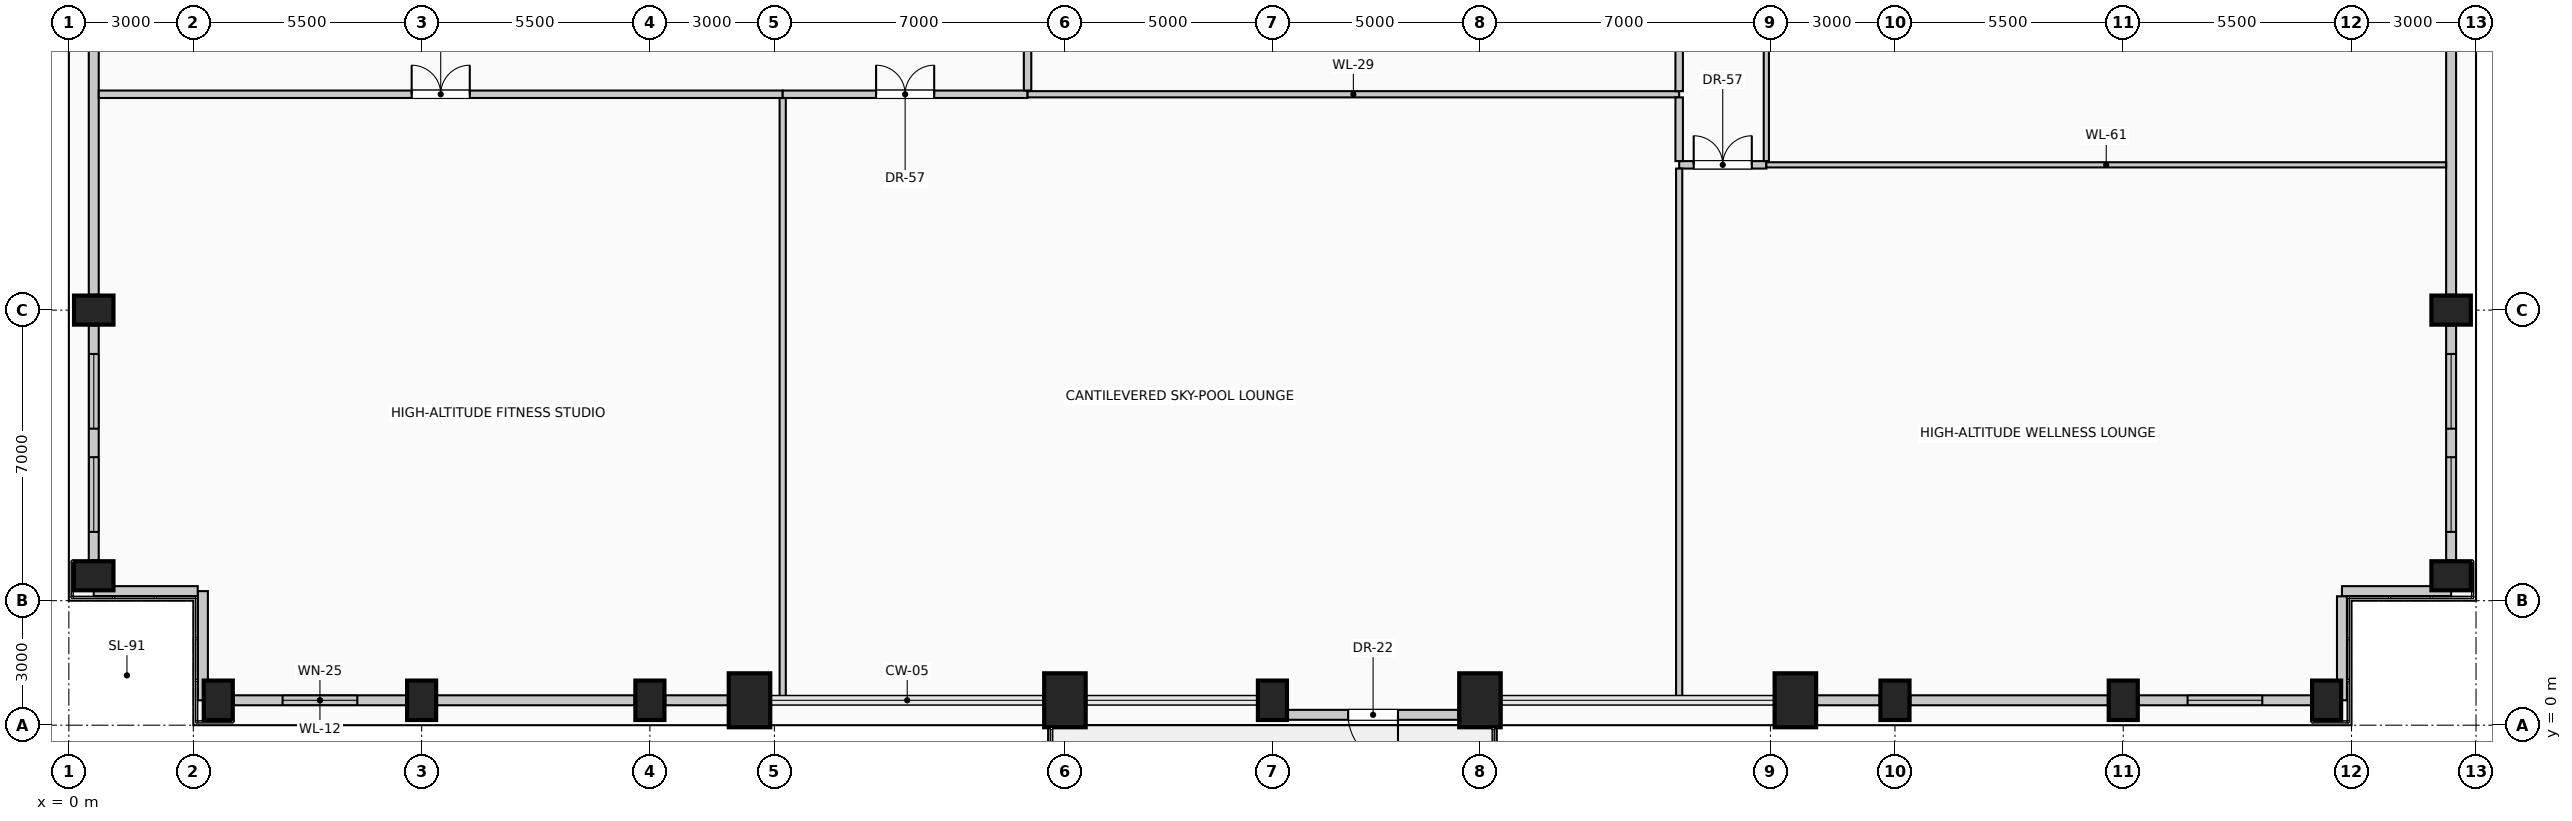
"""IFC4 building model, lengths in metres.
Left out: names, types, materials, properties, quantities, classifications, styles, units other than length and angle.
Written with IfcOpenShell. Run it as: python <this file> out.ifc"""

import sys

from ifc_helpers import new_model, si_unit, direction, frame, frame_2d, origin, origin_2d, place, context, subcontext, project, spatial, rectangle, extrude, element, fill, save


model = new_model("IFC4")
c1 = context("Model", 3, precision=1e-05, world=origin(), true_north=direction((0.0, 1.0)))
c2 = subcontext(c1, "Body", "Model", "MODEL_VIEW")
j1 = project(units=[si_unit("LENGTHUNIT", "METRE"), si_unit("PLANEANGLEUNIT", "RADIAN")], contexts=[c1])
p1 = place(None, origin())
s1 = spatial("IfcSite", under=j1, at=p1, CompositionType="ELEMENT")
p2 = place(p1, origin())
s2 = spatial("IfcBuilding", under=s1, at=p2, CompositionType="ELEMENT")
p3 = place(p2, frame((0.0, 0.0, 280.6)))
s3 = spatial("IfcBuildingStorey", under=s2, at=p3, CompositionType="ELEMENT", Elevation=280.6)
for number, where, z_axis, x_axis in (
    (1, (3.6, 0.6, 0.0), (0.0, 0.0, 1.0), (1.0, 0.0, 0.0)),
    (2, (8.5, 0.6, 0.0), (0.0, 0.0, 1.0), (1.0, 0.0, 0.0)),
    (3, (14.0, 0.6, 0.0), (0.0, 0.0, 1.0), (1.0, 0.0, 0.0)),
):
    element("IfcColumn", number, at=place(p3, frame(where, z_axis=z_axis, x_axis=x_axis)), inside=s3, PredefinedType="COLUMN", context=c2, shape_type="SweptSolid", body=[
        extrude(rectangle(XDim=0.7, YDim=0.95, at=origin_2d()), origin(), (0.0, 0.0, 1.0), 4.4),
    ])
for number, where, z_axis, x_axis in (
    (4, (16.4, 0.6, 0.0), (0.0, 0.0, 1.0), (1.0, 0.0, 0.0)),
    (5, (24.0, 0.6, 0.0), (0.0, 0.0, 1.0), (1.0, 0.0, 0.0)),
):
    element("IfcColumn", number, at=place(p3, frame(where, z_axis=z_axis, x_axis=x_axis)), inside=s3, PredefinedType="COLUMN", context=c2, shape_type="SweptSolid", body=[
        extrude(rectangle(XDim=1.0, YDim=1.3, at=origin_2d()), origin(), (0.0, 0.0, 1.0), 4.4),
    ])
p4 = place(p3, frame((29.0, 0.6, 0.0), z_axis=(0.0, 0.0, 1.0), x_axis=(1.0, 0.0, 0.0)))
e6 = element("IfcColumn", 6, at=p4, inside=s3, PredefinedType="COLUMN", context=c2, shape_type="SweptSolid", body=[
    extrude(rectangle(XDim=0.7, YDim=0.95, at=origin_2d()), origin(), (0.0, 0.0, 1.0), 4.4),
])
for number, where, z_axis, x_axis in (
    (7, (34.0, 0.6, 0.0), (0.0, 0.0, 1.0), (1.0, 0.0, 0.0)),
    (8, (41.6, 0.6, 0.0), (0.0, 0.0, 1.0), (1.0, 0.0, 0.0)),
):
    element("IfcColumn", number, at=place(p3, frame(where, z_axis=z_axis, x_axis=x_axis)), inside=s3, PredefinedType="COLUMN", context=c2, shape_type="SweptSolid", body=[
        extrude(rectangle(XDim=1.0, YDim=1.3, at=origin_2d()), origin(), (0.0, 0.0, 1.0), 4.4),
    ])
for number, where, z_axis, x_axis in (
    (9, (44.0, 0.6, 0.0), (0.0, 0.0, 1.0), (1.0, 0.0, 0.0)),
    (10, (49.5, 0.6, 0.0), (0.0, 0.0, 1.0), (1.0, 0.0, 0.0)),
    (11, (54.4, 0.6, 0.0), (0.0, 0.0, 1.0), (1.0, 0.0, 0.0)),
    (12, (0.6, 3.6, 0.0), (0.0, 0.0, 1.0), (0.0, 1.0, 0.0)),
    (13, (57.4, 3.6, 0.0), (0.0, 0.0, 1.0), (0.0, 1.0, 0.0)),
    (14, (0.6, 10.0, 0.0), (0.0, 0.0, 1.0), (0.0, 1.0, 0.0)),
    (15, (57.4, 10.0, 0.0), (0.0, 0.0, 1.0), (0.0, 1.0, 0.0)),
):
    element("IfcColumn", number, at=place(p3, frame(where, z_axis=z_axis, x_axis=x_axis)), inside=s3, PredefinedType="COLUMN", context=c2, shape_type="SweptSolid", body=[
        extrude(rectangle(XDim=0.7, YDim=0.95, at=origin_2d()), origin(), (0.0, 0.0, 1.0), 4.4),
    ])
p5 = place(p3, frame((8.13, 0.6, 0.0), z_axis=(0.0, 0.0, 1.0), x_axis=(-1.0, 0.0, 0.0)))
e16 = element("IfcWall", 16, at=p5, inside=s3, PredefinedType="SOLIDWALL", context=c2, shape_type="SweptSolid", body=[
    extrude(rectangle(XDim=4.16, YDim=0.24, at=frame_2d((2.08, 0.0))), origin(), (0.0, 0.0, 1.0), 3.4),
])
p6 = place(p5, frame((1.18, 0.0, 0.42)))
e17 = element("IfcOpeningElement", 17, at=p6, cuts=e16, PredefinedType="OPENING", context=c2, shape_type="SweptSolid", body=[
    extrude(rectangle(XDim=1.8, YDim=2.2, at=frame_2d((0.9, 1.1))), frame((0.0, 0.13, 0.0), z_axis=(0.0, -1.0, 0.0), x_axis=(1.0, 0.0, 0.0)), (0.0, 0.0, 1.0), 0.26),
])
p7 = place(p3, frame((13.63, 0.6, 0.0), z_axis=(0.0, 0.0, 1.0), x_axis=(-1.0, 0.0, 0.0)))
e18 = element("IfcWall", 18, at=p7, inside=s3, PredefinedType="SOLIDWALL", context=c2, shape_type="SweptSolid", body=[
    extrude(rectangle(XDim=4.76, YDim=0.24, at=frame_2d((2.38, 0.0))), origin(), (0.0, 0.0, 1.0), 3.4),
])
p8 = place(p3, frame((15.88, 0.6, 0.0), z_axis=(0.0, 0.0, 1.0), x_axis=(-1.0, 0.0, 0.0)))
e19 = element("IfcWall", 19, at=p8, inside=s3, PredefinedType="SOLIDWALL", context=c2, shape_type="SweptSolid", body=[
    extrude(rectangle(XDim=1.51, YDim=0.24, at=frame_2d((0.755, 0.0))), origin(), (0.0, 0.0, 1.0), 3.4),
])
p9 = place(p3, frame((33.48, 0.25, 0.0), z_axis=(0.0, 0.0, 1.0), x_axis=(-1.0, 0.0, 0.0)))
e20 = element("IfcWall", 20, at=p9, inside=s3, PredefinedType="SOLIDWALL", context=c2, shape_type="SweptSolid", body=[
    extrude(rectangle(XDim=4.11, YDim=0.24, at=frame_2d((2.055, 0.0))), origin(), (0.0, 0.0, 1.0), 4.15),
])
p10 = place(p9, frame((1.455, 0.0, 0.0)))
e21 = element("IfcOpeningElement", 21, at=p10, cuts=e20, PredefinedType="OPENING", context=c2, shape_type="SweptSolid", body=[
    extrude(rectangle(XDim=1.2, YDim=2.25, at=frame_2d((0.6, 1.125))), frame((0.0, 0.13, 0.0), z_axis=(0.0, -1.0, 0.0), x_axis=(1.0, 0.0, 0.0)), (0.0, 0.0, 1.0), 0.26),
])
p11 = place(p3, frame((43.63, 0.6, 0.0), z_axis=(0.0, 0.0, 1.0), x_axis=(-1.0, 0.0, 0.0)))
e22 = element("IfcWall", 22, at=p11, inside=s3, PredefinedType="SOLIDWALL", context=c2, shape_type="SweptSolid", body=[
    extrude(rectangle(XDim=1.51, YDim=0.24, at=frame_2d((0.755, 0.0))), origin(), (0.0, 0.0, 1.0), 3.4),
])
p12 = place(p3, frame((49.13, 0.6, 0.0), z_axis=(0.0, 0.0, 1.0), x_axis=(-1.0, 0.0, 0.0)))
e23 = element("IfcWall", 23, at=p12, inside=s3, PredefinedType="SOLIDWALL", context=c2, shape_type="SweptSolid", body=[
    extrude(rectangle(XDim=4.76, YDim=0.24, at=frame_2d((2.38, 0.0))), origin(), (0.0, 0.0, 1.0), 3.4),
])
p13 = place(p3, frame((54.03, 0.6, 0.0), z_axis=(0.0, 0.0, 1.0), x_axis=(-1.0, 0.0, 0.0)))
e24 = element("IfcWall", 24, at=p13, inside=s3, PredefinedType="SOLIDWALL", context=c2, shape_type="SweptSolid", body=[
    extrude(rectangle(XDim=4.16, YDim=0.24, at=frame_2d((2.08, 0.0))), origin(), (0.0, 0.0, 1.0), 3.4),
])
p14 = place(p13, frame((1.18, 0.0, 0.42)))
e25 = element("IfcOpeningElement", 25, at=p14, cuts=e24, PredefinedType="OPENING", context=c2, shape_type="SweptSolid", body=[
    extrude(rectangle(XDim=1.8, YDim=2.2, at=frame_2d((0.9, 1.1))), frame((0.0, 0.13, 0.0), z_axis=(0.0, -1.0, 0.0), x_axis=(1.0, 0.0, 0.0)), (0.0, 0.0, 1.0), 0.26),
])
p15 = place(p3, frame((0.6, 3.97, 0.0), z_axis=(0.0, 0.0, 1.0), x_axis=(0.0, 1.0, 0.0)))
e26 = element("IfcWall", 26, at=p15, inside=s3, PredefinedType="SOLIDWALL", context=c2, shape_type="SweptSolid", body=[
    extrude(rectangle(XDim=5.66, YDim=0.24, at=frame_2d((2.83, 0.0))), origin(), (0.0, 0.0, 1.0), 3.4),
])
p16 = place(p15, frame((0.687, 0.0, 0.42)))
e27 = element("IfcOpeningElement", 27, at=p16, cuts=e26, PredefinedType="OPENING", context=c2, shape_type="SweptSolid", body=[
    extrude(rectangle(XDim=1.8, YDim=2.2, at=frame_2d((0.9, 1.1))), frame((0.0, 0.13, 0.0), z_axis=(0.0, -1.0, 0.0), x_axis=(1.0, 0.0, 0.0)), (0.0, 0.0, 1.0), 0.26),
])
p17 = place(p15, frame((3.173, 0.0, 0.42)))
e28 = element("IfcOpeningElement", 28, at=p17, cuts=e26, PredefinedType="OPENING", context=c2, shape_type="SweptSolid", body=[
    extrude(rectangle(XDim=1.8, YDim=2.2, at=frame_2d((0.9, 1.1))), frame((0.0, 0.13, 0.0), z_axis=(0.0, -1.0, 0.0), x_axis=(1.0, 0.0, 0.0)), (0.0, 0.0, 1.0), 0.26),
])
p18 = place(p3, frame((0.6, 10.37, 0.0), z_axis=(0.0, 0.0, 1.0), x_axis=(0.0, 1.0, 0.0)))
e29 = element("IfcWall", 29, at=p18, inside=s3, PredefinedType="SOLIDWALL", context=c2, shape_type="SweptSolid", body=[
    extrude(rectangle(XDim=7.26, YDim=0.24, at=frame_2d((3.63, 0.0))), origin(), (0.0, 0.0, 1.0), 3.4),
])
p19 = place(p3, frame((57.4, 9.63, 0.0), z_axis=(0.0, 0.0, 1.0), x_axis=(0.0, -1.0, 0.0)))
e30 = element("IfcWall", 30, at=p19, inside=s3, PredefinedType="SOLIDWALL", context=c2, shape_type="SweptSolid", body=[
    extrude(rectangle(XDim=5.66, YDim=0.24, at=frame_2d((2.83, 0.0))), origin(), (0.0, 0.0, 1.0), 3.4),
])
p20 = place(p19, frame((0.687, 0.0, 0.42)))
e31 = element("IfcOpeningElement", 31, at=p20, cuts=e30, PredefinedType="OPENING", context=c2, shape_type="SweptSolid", body=[
    extrude(rectangle(XDim=1.8, YDim=2.2, at=frame_2d((0.9, 1.1))), frame((0.0, 0.13, 0.0), z_axis=(0.0, -1.0, 0.0), x_axis=(1.0, 0.0, 0.0)), (0.0, 0.0, 1.0), 0.26),
])
p21 = place(p19, frame((3.173, 0.0, 0.42)))
e32 = element("IfcOpeningElement", 32, at=p21, cuts=e30, PredefinedType="OPENING", context=c2, shape_type="SweptSolid", body=[
    extrude(rectangle(XDim=1.8, YDim=2.2, at=frame_2d((0.9, 1.1))), frame((0.0, 0.13, 0.0), z_axis=(0.0, -1.0, 0.0), x_axis=(1.0, 0.0, 0.0)), (0.0, 0.0, 1.0), 0.26),
])
p22 = place(p3, frame((57.4, 17.63, 0.0), z_axis=(0.0, 0.0, 1.0), x_axis=(0.0, -1.0, 0.0)))
e33 = element("IfcWall", 33, at=p22, inside=s3, PredefinedType="SOLIDWALL", context=c2, shape_type="SweptSolid", body=[
    extrude(rectangle(XDim=7.26, YDim=0.24, at=frame_2d((3.63, 0.0))), origin(), (0.0, 0.0, 1.0), 3.4),
])
p23 = place(p3, frame((57.4, 3.23, 0.0), z_axis=(0.0, 0.0, 1.0), x_axis=(-1.0, 0.0, 0.0)))
e34 = element("IfcWall", 34, at=p23, inside=s3, PredefinedType="SOLIDWALL", context=c2, shape_type="SweptSolid", body=[
    extrude(rectangle(XDim=2.63, YDim=0.24, at=frame_2d((1.315, 0.0))), origin(), (0.0, 0.0, 1.0), 4.15),
])
p24 = place(p3, frame((54.77, 3.105, 0.0), z_axis=(0.0, 0.0, 1.0), x_axis=(0.0, -1.0, 0.0)))
e35 = element("IfcWall", 35, at=p24, inside=s3, PredefinedType="SOLIDWALL", context=c2, shape_type="SweptSolid", body=[
    extrude(rectangle(XDim=2.505, YDim=0.24, at=frame_2d((1.252, 0.0))), origin(), (0.0, 0.0, 1.0), 4.15),
])
p25 = place(p3, frame((3.23, 0.6, 0.0), z_axis=(0.0, 0.0, 1.0), x_axis=(0.0, 1.0, 0.0)))
e36 = element("IfcWall", 36, at=p25, inside=s3, PredefinedType="SOLIDWALL", context=c2, shape_type="SweptSolid", body=[
    extrude(rectangle(XDim=2.63, YDim=0.24, at=frame_2d((1.315, 0.0))), origin(), (0.0, 0.0, 1.0), 4.15),
])
p26 = place(p3, frame((3.105, 3.23, 0.0), z_axis=(0.0, 0.0, 1.0), x_axis=(-1.0, 0.0, 0.0)))
e37 = element("IfcWall", 37, at=p26, inside=s3, PredefinedType="SOLIDWALL", context=c2, shape_type="SweptSolid", body=[
    extrude(rectangle(XDim=2.505, YDim=0.24, at=frame_2d((1.252, 0.0))), origin(), (0.0, 0.0, 1.0), 4.15),
])
p27 = place(p3, frame((38.8, 13.5, 0.0), z_axis=(0.0, 0.0, 1.0), x_axis=(1.0, 0.0, 0.0)))
e38 = element("IfcWall", 38, at=p27, inside=s3, PredefinedType="PARTITIONING", context=c2, shape_type="SweptSolid", body=[
    extrude(rectangle(XDim=2.1, YDim=0.18, at=frame_2d((1.05, 0.0))), origin(), (0.0, 0.0, 1.0), 4.15),
])
p28 = place(p27, frame((0.35, 0.0, 0.0)))
e39 = element("IfcOpeningElement", 39, at=p28, cuts=e38, PredefinedType="OPENING", context=c2, shape_type="SweptSolid", body=[
    extrude(rectangle(XDim=1.4, YDim=2.2, at=frame_2d((0.7, 1.1))), frame((0.0, 0.1, 0.0), z_axis=(0.0, -1.0, 0.0), x_axis=(1.0, 0.0, 0.0)), (0.0, 0.0, 1.0), 0.2),
])
p29 = place(p3, frame((40.9, 13.5, 0.0), z_axis=(0.0, 0.0, 1.0), x_axis=(1.0, 0.0, 0.0)))
e40 = element("IfcWall", 40, at=p29, inside=s3, PredefinedType="PARTITIONING", context=c2, shape_type="SweptSolid", body=[
    extrude(rectangle(XDim=16.38, YDim=0.125, at=frame_2d((8.19, 0.0))), origin(), (0.0, 0.0, 1.0), 4.15),
])
p30 = place(p3, frame((0.72, 15.2, 0.0), z_axis=(0.0, 0.0, 1.0), x_axis=(1.0, 0.0, 0.0)))
e41 = element("IfcWall", 41, at=p30, inside=s3, PredefinedType="PARTITIONING", context=c2, shape_type="SweptSolid", body=[
    extrude(rectangle(XDim=16.48, YDim=0.18, at=frame_2d((8.24, 0.0))), origin(), (0.0, 0.0, 1.0), 4.15),
])
p31 = place(p30, frame((7.54, 0.0, 0.0)))
e42 = element("IfcOpeningElement", 42, at=p31, cuts=e41, PredefinedType="OPENING", context=c2, shape_type="SweptSolid", body=[
    extrude(rectangle(XDim=1.4, YDim=2.2, at=frame_2d((0.7, 1.1))), frame((0.0, 0.1, 0.0), z_axis=(0.0, -1.0, 0.0), x_axis=(1.0, 0.0, 0.0)), (0.0, 0.0, 1.0), 0.2),
])
p32 = place(p3, frame((17.2, 15.2, 0.0), z_axis=(0.0, 0.0, 1.0), x_axis=(1.0, 0.0, 0.0)))
e43 = element("IfcWall", 43, at=p32, inside=s3, PredefinedType="PARTITIONING", context=c2, shape_type="SweptSolid", body=[
    extrude(rectangle(XDim=5.9, YDim=0.18, at=frame_2d((2.95, 0.0))), origin(), (0.0, 0.0, 1.0), 4.15),
])
p33 = place(p32, frame((2.25, 0.0, 0.0)))
e44 = element("IfcOpeningElement", 44, at=p33, cuts=e43, PredefinedType="OPENING", context=c2, shape_type="SweptSolid", body=[
    extrude(rectangle(XDim=1.4, YDim=2.2, at=frame_2d((0.7, 1.1))), frame((0.0, 0.1, 0.0), z_axis=(0.0, -1.0, 0.0), x_axis=(1.0, 0.0, 0.0)), (0.0, 0.0, 1.0), 0.2),
])
p34 = place(p3, frame((23.1, 15.2, 0.0), z_axis=(0.0, 0.0, 1.0), x_axis=(1.0, 0.0, 0.0)))
e45 = element("IfcWall", 45, at=p34, inside=s3, PredefinedType="PARTITIONING", context=c2, shape_type="SweptSolid", body=[
    extrude(rectangle(XDim=15.7, YDim=0.15, at=frame_2d((7.85, 0.0))), origin(), (0.0, 0.0, 1.0), 4.15),
])
p35 = place(p3, frame((17.2, 0.6, 0.0), z_axis=(0.0, 0.0, 1.0), x_axis=(0.0, 1.0, 0.0)))
e46 = element("IfcWall", 46, at=p35, inside=s3, PredefinedType="PARTITIONING", context=c2, shape_type="SweptSolid", body=[
    extrude(rectangle(XDim=14.51, YDim=0.15, at=frame_2d((7.255, 0.0))), origin(), (0.0, 0.0, 1.0), 4.15),
])
p36 = place(p3, frame((23.1, 15.29, 0.0), z_axis=(0.0, 0.0, 1.0), x_axis=(0.0, 1.0, 0.0)))
e47 = element("IfcWall", 47, at=p36, inside=s3, PredefinedType="PARTITIONING", context=c2, shape_type="SweptSolid", body=[
    extrude(rectangle(XDim=2.01, YDim=0.18, at=frame_2d((1.005, 0.0))), origin(), (0.0, 0.0, 1.0), 4.15),
])
p37 = place(p3, frame((38.8, 0.6, 0.0), z_axis=(0.0, 0.0, 1.0), x_axis=(0.0, 1.0, 0.0)))
e48 = element("IfcWall", 48, at=p37, inside=s3, PredefinedType="PARTITIONING", context=c2, shape_type="SweptSolid", body=[
    extrude(rectangle(XDim=12.81, YDim=0.15, at=frame_2d((6.405, 0.0))), origin(), (0.0, 0.0, 1.0), 4.15),
])
p38 = place(p3, frame((38.8, 13.59, 0.0), z_axis=(0.0, 0.0, 1.0), x_axis=(0.0, 1.0, 0.0)))
e49 = element("IfcWall", 49, at=p38, inside=s3, PredefinedType="PARTITIONING", context=c2, shape_type="SweptSolid", body=[
    extrude(rectangle(XDim=1.535, YDim=0.18, at=frame_2d((0.768, 0.0))), origin(), (0.0, 0.0, 1.0), 4.15),
])
p39 = place(p3, frame((38.8, 15.275, 0.0), z_axis=(0.0, 0.0, 1.0), x_axis=(0.0, 1.0, 0.0)))
e50 = element("IfcWall", 50, at=p39, inside=s3, PredefinedType="PARTITIONING", context=c2, shape_type="SweptSolid", body=[
    extrude(rectangle(XDim=11.535, YDim=0.18, at=frame_2d((5.768, 0.0))), origin(), (0.0, 0.0, 1.0), 4.15),
])
p40 = place(p3, frame((40.9, 13.59, 0.0), z_axis=(0.0, 0.0, 1.0), x_axis=(0.0, 1.0, 0.0)))
e51 = element("IfcWall", 51, at=p40, inside=s3, PredefinedType="PARTITIONING", context=c2, shape_type="SweptSolid", body=[
    extrude(rectangle(XDim=13.247, YDim=0.125, at=frame_2d((6.624, 0.0))), origin(), (0.0, 0.0, 1.0), 4.15),
])
p41 = place(p6, origin())
e52 = element("IfcWindow", 52, at=p41, inside=s3, PartitioningType="SINGLE_PANEL", PredefinedType="WINDOW", context=c2, shape_type="SweptSolid", body=[
    extrude(rectangle(XDim=1.8, YDim=2.2, at=frame_2d((0.9, 1.1))), frame((0.0, 0.03, 0.0), z_axis=(0.0, -1.0, 0.0), x_axis=(1.0, 0.0, 0.0)), (0.0, 0.0, 1.0), 0.06),
])
fill(e17, e52)
p42 = place(p10, origin())
e53 = element("IfcDoor", 53, at=p42, inside=s3, OperationType="SINGLE_SWING_LEFT", PredefinedType="DOOR", context=c2, shape_type="SweptSolid", body=[
    extrude(rectangle(XDim=1.2, YDim=2.25, at=frame_2d((0.6, 1.125))), frame((0.0, 0.025, 0.0), z_axis=(0.0, -1.0, 0.0), x_axis=(1.0, 0.0, 0.0)), (0.0, 0.0, 1.0), 0.05),
])
fill(e21, e53)
p43 = place(p14, origin())
e54 = element("IfcWindow", 54, at=p43, inside=s3, PartitioningType="SINGLE_PANEL", PredefinedType="WINDOW", context=c2, shape_type="SweptSolid", body=[
    extrude(rectangle(XDim=1.8, YDim=2.2, at=frame_2d((0.9, 1.1))), frame((0.0, 0.03, 0.0), z_axis=(0.0, -1.0, 0.0), x_axis=(1.0, 0.0, 0.0)), (0.0, 0.0, 1.0), 0.06),
])
fill(e25, e54)
p44 = place(p16, origin())
e55 = element("IfcWindow", 55, at=p44, inside=s3, PartitioningType="SINGLE_PANEL", PredefinedType="WINDOW", context=c2, shape_type="SweptSolid", body=[
    extrude(rectangle(XDim=1.8, YDim=2.2, at=frame_2d((0.9, 1.1))), frame((0.0, 0.03, 0.0), z_axis=(0.0, -1.0, 0.0), x_axis=(1.0, 0.0, 0.0)), (0.0, 0.0, 1.0), 0.06),
])
fill(e27, e55)
p45 = place(p17, origin())
e56 = element("IfcWindow", 56, at=p45, inside=s3, PartitioningType="SINGLE_PANEL", PredefinedType="WINDOW", context=c2, shape_type="SweptSolid", body=[
    extrude(rectangle(XDim=1.8, YDim=2.2, at=frame_2d((0.9, 1.1))), frame((0.0, 0.03, 0.0), z_axis=(0.0, -1.0, 0.0), x_axis=(1.0, 0.0, 0.0)), (0.0, 0.0, 1.0), 0.06),
])
fill(e28, e56)
p46 = place(p20, origin())
e57 = element("IfcWindow", 57, at=p46, inside=s3, PartitioningType="SINGLE_PANEL", PredefinedType="WINDOW", context=c2, shape_type="SweptSolid", body=[
    extrude(rectangle(XDim=1.8, YDim=2.2, at=frame_2d((0.9, 1.1))), frame((0.0, 0.03, 0.0), z_axis=(0.0, -1.0, 0.0), x_axis=(1.0, 0.0, 0.0)), (0.0, 0.0, 1.0), 0.06),
])
fill(e31, e57)
p47 = place(p21, origin())
e58 = element("IfcWindow", 58, at=p47, inside=s3, PartitioningType="SINGLE_PANEL", PredefinedType="WINDOW", context=c2, shape_type="SweptSolid", body=[
    extrude(rectangle(XDim=1.8, YDim=2.2, at=frame_2d((0.9, 1.1))), frame((0.0, 0.03, 0.0), z_axis=(0.0, -1.0, 0.0), x_axis=(1.0, 0.0, 0.0)), (0.0, 0.0, 1.0), 0.06),
])
fill(e32, e58)
p48 = place(p28, origin())
e59 = element("IfcDoor", 59, at=p48, inside=s3, OperationType="DOUBLE_DOOR_SINGLE_SWING", PredefinedType="DOOR", context=c2, shape_type="SweptSolid", body=[
    extrude(rectangle(XDim=1.4, YDim=2.2, at=frame_2d((0.7, 1.1))), frame((0.0, 0.025, 0.0), z_axis=(0.0, -1.0, 0.0), x_axis=(1.0, 0.0, 0.0)), (0.0, 0.0, 1.0), 0.05),
])
fill(e39, e59)
p49 = place(p31, origin())
e60 = element("IfcDoor", 60, at=p49, inside=s3, OperationType="DOUBLE_DOOR_SINGLE_SWING", PredefinedType="DOOR", context=c2, shape_type="SweptSolid", body=[
    extrude(rectangle(XDim=1.4, YDim=2.2, at=frame_2d((0.7, 1.1))), frame((0.0, 0.025, 0.0), z_axis=(0.0, -1.0, 0.0), x_axis=(1.0, 0.0, 0.0)), (0.0, 0.0, 1.0), 0.05),
])
fill(e42, e60)
p50 = place(p33, origin())
e61 = element("IfcDoor", 61, at=p50, inside=s3, OperationType="DOUBLE_DOOR_SINGLE_SWING", PredefinedType="DOOR", context=c2, shape_type="SweptSolid", body=[
    extrude(rectangle(XDim=1.4, YDim=2.2, at=frame_2d((0.7, 1.1))), frame((0.0, 0.025, 0.0), z_axis=(0.0, -1.0, 0.0), x_axis=(1.0, 0.0, 0.0)), (0.0, 0.0, 1.0), 0.05),
])
fill(e44, e61)
save(model, sys.argv[1])
